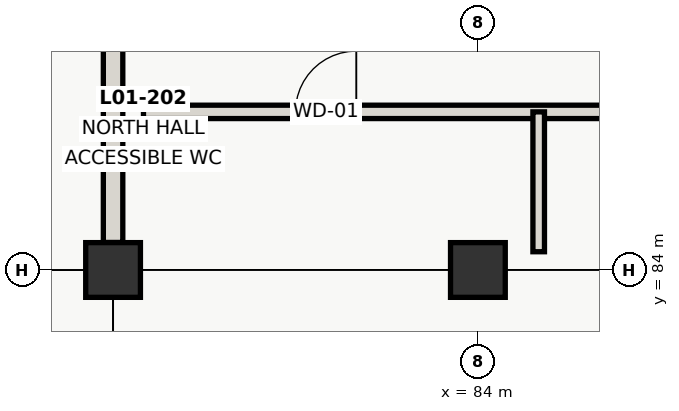
"""IFC4 building model, lengths in metres.
Left out: names, types, materials, properties, quantities, classifications, styles, units other than length and angle.
Written with IfcOpenShell. Run it as: python <this file> out.ifc"""

import sys

from ifc_helpers import new_model, si_unit, direction, frame, frame_2d, origin, origin_2d, place, context, subcontext, project, spatial, rectangle, extrude, element, fill, save


model = new_model("IFC4")
c1 = context("Model", 3, precision=1e-05, world=origin(), true_north=direction((0.0, 1.0)))
c2 = subcontext(c1, "Body", "Model", "MODEL_VIEW")
j1 = project(units=[si_unit("LENGTHUNIT", "METRE"), si_unit("PLANEANGLEUNIT", "RADIAN")], contexts=[c1])
p1 = place(None, origin())
s1 = spatial("IfcSite", under=j1, at=p1, CompositionType="ELEMENT")
p2 = place(p1, origin())
s2 = spatial("IfcBuilding", under=s1, at=p2, CompositionType="ELEMENT")
p3 = place(p2, origin())
s3 = spatial("IfcBuildingStorey", under=s2, at=p3, CompositionType="ELEMENT", Elevation=0.0)
for number, where, z_axis, x_axis in (
    (1, (78.0, 84.0, 0.0), (0.0, 0.0, 1.0), (1.0, 0.0, 0.0)),
    (2, (84.0, 84.0, 0.0), (0.0, 0.0, 1.0), (1.0, 0.0, 0.0)),
):
    element("IfcColumn", number, at=place(p3, frame(where, z_axis=z_axis, x_axis=x_axis)), inside=s3, PredefinedType="COLUMN", context=c2, shape_type="SweptSolid", body=[
        extrude(rectangle(XDim=0.9, YDim=0.9, at=origin_2d()), origin(), (0.0, 0.0, 1.0), 4.2),
    ])
p4 = place(p3, frame((78.0, 84.452, 0.0), z_axis=(0.0, 0.0, 1.0), x_axis=(0.0, 1.0, 0.0)))
e3 = element("IfcWall", 3, at=p4, inside=s3, PredefinedType="SHEAR", context=c2, shape_type="SweptSolid", body=[
    extrude(rectangle(XDim=17.146, YDim=0.32, at=frame_2d((8.573, 0.0))), origin(), (0.0, 0.0, 1.0), 3.8),
])
p5 = place(p4, frame((6.898, 0.0, 0.0)))
e4 = element("IfcOpeningElement", 4, at=p5, cuts=e3, PredefinedType="OPENING", context=c2, shape_type="SweptSolid", body=[
    extrude(rectangle(XDim=2.5, YDim=2.4, at=frame_2d((1.25, 1.2))), frame((0.0, 0.17, 0.0), z_axis=(0.0, -1.0, 0.0), x_axis=(1.0, 0.0, 0.0)), (0.0, 0.0, 1.0), 0.34),
])
p6 = place(p3, frame((78.5, 86.6, 0.0), z_axis=(0.0, 0.0, 1.0), x_axis=(1.0, 0.0, 0.0)))
e5 = element("IfcWall", 5, at=p6, inside=s3, PredefinedType="PLUMBINGWALL", context=c2, shape_type="SweptSolid", body=[
    extrude(rectangle(XDim=27.5, YDim=0.22, at=frame_2d((13.75, 0.0))), origin(), (0.0, 0.0, 1.0), 3.7),
])
p7 = place(p6, frame((2.5, 0.0, 0.0)))
e6 = element("IfcOpeningElement", 6, at=p7, cuts=e5, PredefinedType="OPENING", context=c2, shape_type="SweptSolid", body=[
    extrude(rectangle(XDim=1.0, YDim=2.1, at=frame_2d((0.5, 1.05))), frame((0.0, 0.12, 0.0), z_axis=(0.0, -1.0, 0.0), x_axis=(1.0, 0.0, 0.0)), (0.0, 0.0, 1.0), 0.24),
])
p8 = place(p6, frame((11.0, 0.0, 0.0)))
e7 = element("IfcOpeningElement", 7, at=p8, cuts=e5, PredefinedType="OPENING", context=c2, shape_type="SweptSolid", body=[
    extrude(rectangle(XDim=0.9, YDim=2.05, at=frame_2d((0.45, 1.025))), frame((0.0, 0.12, 0.0), z_axis=(0.0, -1.0, 0.0), x_axis=(1.0, 0.0, 0.0)), (0.0, 0.0, 1.0), 0.24),
])
p9 = place(p6, frame((22.5, 0.0, 0.0)))
e8 = element("IfcOpeningElement", 8, at=p9, cuts=e5, PredefinedType="OPENING", context=c2, shape_type="SweptSolid", body=[
    extrude(rectangle(XDim=1.12, YDim=2.1, at=frame_2d((0.56, 1.05))), frame((0.0, 0.12, 0.0), z_axis=(0.0, -1.0, 0.0), x_axis=(1.0, 0.0, 0.0)), (0.0, 0.0, 1.0), 0.24),
])
p10 = place(p3, frame((85.0, 84.3, 0.0), z_axis=(0.0, 0.0, 1.0), x_axis=(0.0, 1.0, 0.0)))
e9 = element("IfcWall", 9, at=p10, inside=s3, PredefinedType="PLUMBINGWALL", context=c2, shape_type="SweptSolid", body=[
    extrude(rectangle(XDim=2.3, YDim=0.19, at=frame_2d((1.15, 0.0))), origin(), (0.0, 0.0, 1.0), 3.7),
])
p11 = place(p7, origin())
e10 = element("IfcDoor", 10, at=p11, inside=s3, OperationType="SINGLE_SWING_RIGHT", PredefinedType="DOOR", context=c2, shape_type="SweptSolid", body=[
    extrude(rectangle(XDim=1.0, YDim=2.1, at=frame_2d((0.5, 1.05))), frame((0.0, 0.025, 0.0), z_axis=(0.0, -1.0, 0.0), x_axis=(1.0, 0.0, 0.0)), (0.0, 0.0, 1.0), 0.05),
])
fill(e6, e10)
save(model, sys.argv[1])
